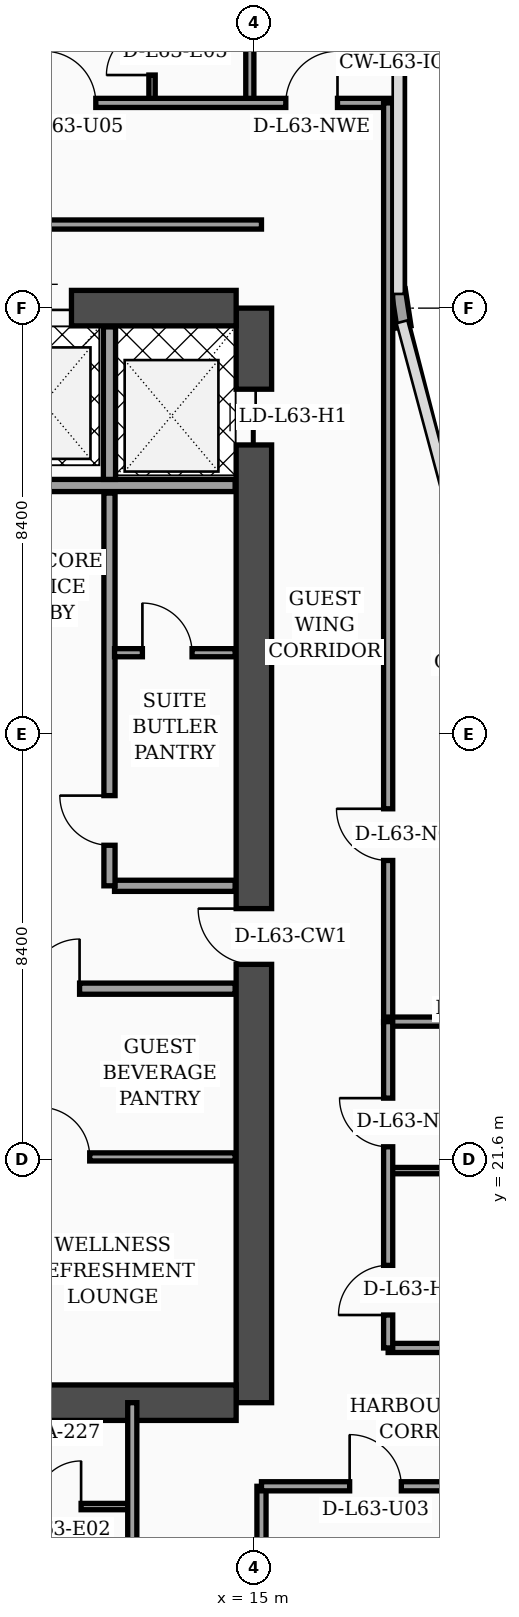
"""IFC4 building model, lengths in metres.
Left out: names, types, materials, properties, quantities, classifications, styles, units other than length and angle.
Written with IfcOpenShell. Run it as: python <this file> out.ifc"""

import sys

from ifc_helpers import new_model, si_unit, direction, frame, frame_2d, origin, place, context, subcontext, project, spatial, rectangle, extrude, element, fill, save


model = new_model("IFC4")
c1 = context("Model", 3, precision=1e-05, world=origin(), true_north=direction((0.0, 1.0)))
c2 = subcontext(c1, "Body", "Model", "MODEL_VIEW")
j1 = project(units=[si_unit("LENGTHUNIT", "METRE"), si_unit("PLANEANGLEUNIT", "RADIAN")], contexts=[c1])
p1 = place(None, origin())
s1 = spatial("IfcSite", under=j1, at=p1, CompositionType="ELEMENT")
p2 = place(p1, origin())
s2 = spatial("IfcBuilding", under=s1, at=p2, CompositionType="ELEMENT")
p3 = place(p2, frame((0.0, 0.0, 255.2)))
s3 = spatial("IfcBuildingStorey", under=s2, at=p3, CompositionType="ELEMENT", Elevation=255.2)
p4 = place(p3, frame((15.0, 16.8, 0.0), z_axis=(0.0, 0.0, 1.0), x_axis=(0.0, 1.0, 0.0)))
e1 = element("IfcWall", 1, at=p4, inside=s3, PredefinedType="SHEAR", context=c2, shape_type="SweptSolid", body=[
    extrude(rectangle(XDim=21.6, YDim=0.7, at=frame_2d((10.8, 0.0))), origin(), (0.0, 0.0, 1.0), 3.56),
])
p5 = place(p4, frame((8.65, 0.0, 0.0)))
e2 = element("IfcOpeningElement", 2, at=p5, cuts=e1, PredefinedType="OPENING", context=c2, shape_type="SweptSolid", body=[
    extrude(rectangle(XDim=1.1, YDim=2.2, at=frame_2d((0.55, 1.1))), frame((0.0, 0.36, 0.0), z_axis=(0.0, -1.0, 0.0), x_axis=(1.0, 0.0, 0.0)), (0.0, 0.0, 1.0), 0.72),
])
p6 = place(p4, frame((18.9, 0.0, 0.0)))
e3 = element("IfcOpeningElement", 3, at=p6, cuts=e1, PredefinedType="OPENING", context=c2, shape_type="SweptSolid", body=[
    extrude(rectangle(XDim=1.1, YDim=2.2, at=frame_2d((0.55, 1.1))), frame((0.0, 0.36, 0.0), z_axis=(0.0, -1.0, 0.0), x_axis=(1.0, 0.0, 0.0)), (0.0, 0.0, 1.0), 0.72),
])
p7 = place(p3, frame((4.55, 38.4, 0.0), z_axis=(0.0, 0.0, 1.0), x_axis=(1.0, 0.0, 0.0)))
e4 = element("IfcWall", 4, at=p7, inside=s3, PredefinedType="SHEAR", context=c2, shape_type="SweptSolid", body=[
    extrude(rectangle(XDim=10.1, YDim=0.7, at=frame_2d((5.05, 0.0))), origin(), (0.0, 0.0, 1.0), 3.56),
])
p8 = place(p7, frame((5.75, 0.0, 0.0)))
e5 = element("IfcOpeningElement", 5, at=p8, cuts=e4, PredefinedType="OPENING", context=c2, shape_type="SweptSolid", body=[
    extrude(rectangle(XDim=1.1, YDim=2.2, at=frame_2d((0.55, 1.1))), frame((0.0, 0.36, 0.0), z_axis=(0.0, -1.0, 0.0), x_axis=(1.0, 0.0, 0.0)), (0.0, 0.0, 1.0), 0.72),
])
p9 = place(p3, frame((4.55, 16.8, 0.0), z_axis=(0.0, 0.0, 1.0), x_axis=(1.0, 0.0, 0.0)))
e6 = element("IfcWall", 6, at=p9, inside=s3, PredefinedType="SHEAR", context=c2, shape_type="SweptSolid", body=[
    extrude(rectangle(XDim=10.1, YDim=0.7, at=frame_2d((5.05, 0.0))), origin(), (0.0, 0.0, 1.0), 3.56),
])
p10 = place(p3, frame((17.962, 38.03, 0.0), z_axis=(0.0, 0.0, 1.0), x_axis=(-0.15141125477, 0.988470855377, 0.0)))
e7 = element("IfcWall", 7, at=p10, inside=s3, PredefinedType="SOLIDWALL", context=c2, shape_type="SweptSolid", body=[
    extrude(rectangle(XDim=0.739, YDim=0.28, at=frame_2d((0.369, 0.0))), origin(), (0.0, 0.0, 1.0), 3.56),
])
p11 = place(p3, frame((9.68, 21.65, 0.0), z_axis=(0.0, 0.0, 1.0), x_axis=(1.0, 0.0, 0.0)))
e8 = element("IfcWall", 8, at=p11, inside=s3, PredefinedType="PARTITIONING", context=c2, shape_type="SweptSolid", body=[
    extrude(rectangle(XDim=4.95, YDim=0.16, at=frame_2d((2.475, 0.0))), origin(), (0.0, 0.0, 1.0), 3.09),
])
p12 = place(p11, frame((1.1, 0.0, 0.0)))
e9 = element("IfcOpeningElement", 9, at=p12, cuts=e8, PredefinedType="OPENING", context=c2, shape_type="SweptSolid", body=[
    extrude(rectangle(XDim=0.98, YDim=2.15, at=frame_2d((0.49, 1.075))), frame((0.0, 0.09, 0.0), z_axis=(0.0, -1.0, 0.0), x_axis=(1.0, 0.0, 0.0)), (0.0, 0.0, 1.0), 0.18),
])
p13 = place(p3, frame((9.68, 24.97, 0.0), z_axis=(0.0, 0.0, 1.0), x_axis=(1.0, 0.0, 0.0)))
e10 = element("IfcWall", 10, at=p13, inside=s3, PredefinedType="SOLIDWALL", context=c2, shape_type="SweptSolid", body=[
    extrude(rectangle(XDim=4.95, YDim=0.22, at=frame_2d((2.475, 0.0))), origin(), (0.0, 0.0, 1.0), 2.99),
])
p14 = place(p13, frame((0.9, 0.0, 0.0)))
e11 = element("IfcOpeningElement", 11, at=p14, cuts=e10, PredefinedType="OPENING", context=c2, shape_type="SweptSolid", body=[
    extrude(rectangle(XDim=0.98, YDim=2.15, at=frame_2d((0.49, 1.075))), frame((0.0, 0.12, 0.0), z_axis=(0.0, -1.0, 0.0), x_axis=(1.0, 0.0, 0.0)), (0.0, 0.0, 1.0), 0.24),
])
p15 = place(p3, frame((12.25, 27.0, 0.0), z_axis=(0.0, 0.0, 1.0), x_axis=(1.0, 0.0, 0.0)))
e12 = element("IfcWall", 12, at=p15, inside=s3, PredefinedType="SOLIDWALL", context=c2, shape_type="SweptSolid", body=[
    extrude(rectangle(XDim=2.38, YDim=0.22, at=frame_2d((1.19, 0.0))), origin(), (0.0, 0.0, 1.0), 3.56),
])
p16 = place(p3, frame((12.15, 27.0, 0.0), z_axis=(0.0, 0.0, 1.0), x_axis=(0.0, 1.0, 0.0)))
e13 = element("IfcWall", 13, at=p16, inside=s3, PredefinedType="SOLIDWALL", context=c2, shape_type="SweptSolid", body=[
    extrude(rectangle(XDim=7.75, YDim=0.22, at=frame_2d((3.875, 0.0))), origin(), (0.0, 0.0, 1.0), 3.56),
])
p17 = place(p16, frame((0.8, 0.0, 0.0)))
e14 = element("IfcOpeningElement", 14, at=p17, cuts=e13, PredefinedType="OPENING", context=c2, shape_type="SweptSolid", body=[
    extrude(rectangle(XDim=0.98, YDim=2.15, at=frame_2d((0.49, 1.075))), frame((0.0, 0.12, 0.0), z_axis=(0.0, -1.0, 0.0), x_axis=(1.0, 0.0, 0.0)), (0.0, 0.0, 1.0), 0.24),
])
p18 = place(p3, frame((12.25, 31.6, 0.0), z_axis=(0.0, 0.0, 1.0), x_axis=(1.0, 0.0, 0.0)))
e15 = element("IfcWall", 15, at=p18, inside=s3, PredefinedType="PARTITIONING", context=c2, shape_type="SweptSolid", body=[
    extrude(rectangle(XDim=2.38, YDim=0.16, at=frame_2d((1.19, 0.0))), origin(), (0.0, 0.0, 1.0), 3.14),
])
p19 = place(p18, frame((0.55, 0.0, 0.0)))
e16 = element("IfcOpeningElement", 16, at=p19, cuts=e15, PredefinedType="OPENING", context=c2, shape_type="SweptSolid", body=[
    extrude(rectangle(XDim=0.98, YDim=2.15, at=frame_2d((0.49, 1.075))), frame((0.0, 0.09, 0.0), z_axis=(0.0, -1.0, 0.0), x_axis=(1.0, 0.0, 0.0)), (0.0, 0.0, 1.0), 0.18),
])
p20 = place(p3, frame((9.66, 34.9, 0.0), z_axis=(0.0, 0.0, 1.0), x_axis=(1.0, 0.0, 0.0)))
e17 = element("IfcWall", 17, at=p20, inside=s3, PredefinedType="SOLIDWALL", context=c2, shape_type="SweptSolid", body=[
    extrude(rectangle(XDim=4.97, YDim=0.24, at=frame_2d((2.485, 0.0))), origin(), (0.0, 0.0, 1.0), 3.56),
])
p21 = place(p3, frame((12.15, 35.02, 0.0), z_axis=(0.0, 0.0, 1.0), x_axis=(0.0, 1.0, 0.0)))
e18 = element("IfcWall", 18, at=p21, inside=s3, PredefinedType="SOLIDWALL", context=c2, shape_type="SweptSolid", body=[
    extrude(rectangle(XDim=3.01, YDim=0.24, at=frame_2d((1.505, 0.0))), origin(), (0.0, 0.0, 1.0), 3.56),
])
p22 = place(p3, frame((0.08, 14.75, 0.0), z_axis=(0.0, 0.0, 1.0), x_axis=(1.0, 0.0, 0.0)))
e19 = element("IfcWall", 19, at=p22, inside=s3, PredefinedType="PARTITIONING", context=c2, shape_type="SweptSolid", body=[
    extrude(rectangle(XDim=12.52, YDim=0.125, at=frame_2d((6.26, 0.0))), origin(), (0.0, 0.0, 1.0), 2.99),
])
p23 = place(p22, frame((4.32, 0.0, 0.0)))
e20 = element("IfcOpeningElement", 20, at=p23, cuts=e19, PredefinedType="OPENING", context=c2, shape_type="SweptSolid", body=[
    extrude(rectangle(XDim=0.96, YDim=2.2, at=frame_2d((0.48, 1.1))), frame((0.0, 0.073, 0.0), z_axis=(0.0, -1.0, 0.0), x_axis=(1.0, 0.0, 0.0)), (0.0, 0.0, 1.0), 0.145),
])
p24 = place(p22, frame((10.61, 0.0, 0.0)))
e21 = element("IfcOpeningElement", 21, at=p24, cuts=e19, PredefinedType="OPENING", context=c2, shape_type="SweptSolid", body=[
    extrude(rectangle(XDim=0.9, YDim=2.15, at=frame_2d((0.45, 1.075))), frame((0.0, 0.073, 0.0), z_axis=(0.0, -1.0, 0.0), x_axis=(1.0, 0.0, 0.0)), (0.0, 0.0, 1.0), 0.145),
])
p25 = place(p3, frame((12.6, 2.44, 0.0), z_axis=(0.0, 0.0, 1.0), x_axis=(0.0, 1.0, 0.0)))
e22 = element("IfcWall", 22, at=p25, inside=s3, PredefinedType="PARTITIONING", context=c2, shape_type="SweptSolid", body=[
    extrude(rectangle(XDim=14.36, YDim=0.18, at=frame_2d((7.18, 0.0))), origin(), (0.0, 0.0, 1.0), 2.99),
])
p26 = place(p25, frame((3.01, 0.0, 0.0)))
e23 = element("IfcOpeningElement", 23, at=p26, cuts=e22, PredefinedType="OPENING", context=c2, shape_type="SweptSolid", body=[
    extrude(rectangle(XDim=1.02, YDim=2.2, at=frame_2d((0.51, 1.1))), frame((0.0, 0.1, 0.0), z_axis=(0.0, -1.0, 0.0), x_axis=(1.0, 0.0, 0.0)), (0.0, 0.0, 1.0), 0.2),
])
p27 = place(p25, frame((9.95, 0.0, 0.0)))
e24 = element("IfcOpeningElement", 24, at=p27, cuts=e22, PredefinedType="OPENING", context=c2, shape_type="SweptSolid", body=[
    extrude(rectangle(XDim=1.02, YDim=2.2, at=frame_2d((0.51, 1.1))), frame((0.0, 0.1, 0.0), z_axis=(0.0, -1.0, 0.0), x_axis=(1.0, 0.0, 0.0)), (0.0, 0.0, 1.0), 0.2),
])
p28 = place(p3, frame((15.15, 2.44, 0.0), z_axis=(0.0, 0.0, 1.0), x_axis=(0.0, 1.0, 0.0)))
e25 = element("IfcWall", 25, at=p28, inside=s3, PredefinedType="PARTITIONING", context=c2, shape_type="SweptSolid", body=[
    extrude(rectangle(XDim=12.71, YDim=0.18, at=frame_2d((6.355, 0.0))), origin(), (0.0, 0.0, 1.0), 3.09),
])
p29 = place(p3, frame((15.15, 15.15, 0.0), z_axis=(0.0, 0.0, 1.0), x_axis=(1.0, 0.0, 0.0)))
e26 = element("IfcWall", 26, at=p29, inside=s3, PredefinedType="PARTITIONING", context=c2, shape_type="SweptSolid", body=[
    extrude(rectangle(XDim=6.45, YDim=0.18, at=frame_2d((3.225, 0.0))), origin(), (0.0, 0.0, 1.0), 2.59),
])
p30 = place(p29, frame((1.74, 0.0, 0.0)))
e27 = element("IfcOpeningElement", 27, at=p30, cuts=e26, PredefinedType="OPENING", context=c2, shape_type="SweptSolid", body=[
    extrude(rectangle(XDim=1.02, YDim=2.2, at=frame_2d((0.51, 1.1))), frame((0.0, 0.1, 0.0), z_axis=(0.0, -1.0, 0.0), x_axis=(1.0, 0.0, 0.0)), (0.0, 0.0, 1.0), 0.2),
])
p31 = place(p3, frame((14.92, 42.45, 0.0), z_axis=(0.0, 0.0, 1.0), x_axis=(0.0, 1.0, 0.0)))
e28 = element("IfcWall", 28, at=p31, inside=s3, PredefinedType="PARTITIONING", context=c2, shape_type="SweptSolid", body=[
    extrude(rectangle(XDim=5.35, YDim=0.16, at=frame_2d((2.675, 0.0))), origin(), (0.0, 0.0, 1.0), 3.09),
])
p32 = place(p3, frame((12.99, 42.45, 0.0), z_axis=(0.0, 0.0, 1.0), x_axis=(0.0, 1.0, 0.0)))
e29 = element("IfcWall", 29, at=p32, inside=s3, PredefinedType="PARTITIONING", context=c2, shape_type="SweptSolid", body=[
    extrude(rectangle(XDim=8.49, YDim=0.125, at=frame_2d((4.245, 0.0))), origin(), (0.0, 0.0, 1.0), 3.09),
])
p33 = place(p32, frame((0.55, 0.0, 0.0)))
e30 = element("IfcOpeningElement", 30, at=p33, cuts=e29, PredefinedType="OPENING", context=c2, shape_type="SweptSolid", body=[
    extrude(rectangle(XDim=0.9, YDim=2.15, at=frame_2d((0.45, 1.075))), frame((0.0, 0.073, 0.0), z_axis=(0.0, -1.0, 0.0), x_axis=(1.0, 0.0, 0.0)), (0.0, 0.0, 1.0), 0.145),
])
p34 = place(p32, frame((4.72, 0.0, 0.0)))
e31 = element("IfcOpeningElement", 31, at=p34, cuts=e29, PredefinedType="OPENING", context=c2, shape_type="SweptSolid", body=[
    extrude(rectangle(XDim=0.96, YDim=2.2, at=frame_2d((0.48, 1.1))), frame((0.0, 0.073, 0.0), z_axis=(0.0, -1.0, 0.0), x_axis=(1.0, 0.0, 0.0)), (0.0, 0.0, 1.0), 0.145),
])
p35 = place(p3, frame((0.08, 42.45, 0.0), z_axis=(0.0, 0.0, 1.0), x_axis=(1.0, 0.0, 0.0)))
e32 = element("IfcWall", 32, at=p35, inside=s3, PredefinedType="PARTITIONING", context=c2, shape_type="SweptSolid", body=[
    extrude(rectangle(XDim=17.77, YDim=0.18, at=frame_2d((8.885, 0.0))), origin(), (0.0, 0.0, 1.0), 2.99),
])
p36 = place(p35, frame((0.9, 0.0, 0.0)))
e33 = element("IfcOpeningElement", 33, at=p36, cuts=e32, PredefinedType="OPENING", context=c2, shape_type="SweptSolid", body=[
    extrude(rectangle(XDim=1.02, YDim=2.2, at=frame_2d((0.51, 1.1))), frame((0.0, 0.1, 0.0), z_axis=(0.0, -1.0, 0.0), x_axis=(1.0, 0.0, 0.0)), (0.0, 0.0, 1.0), 0.2),
])
p37 = place(p35, frame((4.9, 0.0, 0.0)))
e34 = element("IfcOpeningElement", 34, at=p37, cuts=e32, PredefinedType="OPENING", context=c2, shape_type="SweptSolid", body=[
    extrude(rectangle(XDim=1.02, YDim=2.2, at=frame_2d((0.51, 1.1))), frame((0.0, 0.1, 0.0), z_axis=(0.0, -1.0, 0.0), x_axis=(1.0, 0.0, 0.0)), (0.0, 0.0, 1.0), 0.2),
])
p38 = place(p35, frame((10.78, 0.0, 0.0)))
e35 = element("IfcOpeningElement", 35, at=p38, cuts=e32, PredefinedType="OPENING", context=c2, shape_type="SweptSolid", body=[
    extrude(rectangle(XDim=1.02, YDim=2.2, at=frame_2d((0.51, 1.1))), frame((0.0, 0.1, 0.0), z_axis=(0.0, -1.0, 0.0), x_axis=(1.0, 0.0, 0.0)), (0.0, 0.0, 1.0), 0.2),
])
p39 = place(p35, frame((15.55, 0.0, 0.0)))
e36 = element("IfcOpeningElement", 36, at=p39, cuts=e32, PredefinedType="OPENING", context=c2, shape_type="SweptSolid", body=[
    extrude(rectangle(XDim=1.02, YDim=2.2, at=frame_2d((0.51, 1.1))), frame((0.0, 0.1, 0.0), z_axis=(0.0, -1.0, 0.0), x_axis=(1.0, 0.0, 0.0)), (0.0, 0.0, 1.0), 0.2),
])
p40 = place(p3, frame((17.65, 24.3, 0.0), z_axis=(0.0, 0.0, 1.0), x_axis=(0.0, 1.0, 0.0)))
e37 = element("IfcWall", 37, at=p40, inside=s3, PredefinedType="PARTITIONING", context=c2, shape_type="SweptSolid", body=[
    extrude(rectangle(XDim=18.15, YDim=0.18, at=frame_2d((9.075, 0.0))), origin(), (0.0, 0.0, 1.0), 2.99),
])
p41 = place(p40, frame((3.2, 0.0, 0.0)))
e38 = element("IfcOpeningElement", 38, at=p41, cuts=e37, PredefinedType="OPENING", context=c2, shape_type="SweptSolid", body=[
    extrude(rectangle(XDim=1.02, YDim=2.2, at=frame_2d((0.51, 1.1))), frame((0.0, 0.1, 0.0), z_axis=(0.0, -1.0, 0.0), x_axis=(1.0, 0.0, 0.0)), (0.0, 0.0, 1.0), 0.2),
])
p42 = place(p3, frame((3.83, 40.05, 0.0), z_axis=(0.0, 0.0, 1.0), x_axis=(1.0, 0.0, 0.0)))
e39 = element("IfcWall", 39, at=p42, inside=s3, PredefinedType="PARTITIONING", context=c2, shape_type="SweptSolid", body=[
    extrude(rectangle(XDim=11.32, YDim=0.18, at=frame_2d((5.66, 0.0))), origin(), (0.0, 0.0, 1.0), 2.99),
])
p43 = place(p3, frame((17.65, 17.88, 0.0), z_axis=(0.0, 0.0, 1.0), x_axis=(1.0, 0.0, 0.0)))
e40 = element("IfcWall", 40, at=p43, inside=s3, PredefinedType="PARTITIONING", context=c2, shape_type="SweptSolid", body=[
    extrude(rectangle(XDim=3.9, YDim=0.18, at=frame_2d((1.95, 0.0))), origin(), (0.0, 0.0, 1.0), 3.56),
])
p44 = place(p3, frame((17.65, 21.38, 0.0), z_axis=(0.0, 0.0, 1.0), x_axis=(1.0, 0.0, 0.0)))
e41 = element("IfcWall", 41, at=p44, inside=s3, PredefinedType="PARTITIONING", context=c2, shape_type="SweptSolid", body=[
    extrude(rectangle(XDim=3.9, YDim=0.125, at=frame_2d((1.95, 0.0))), origin(), (0.0, 0.0, 1.0), 3.09),
])
p45 = place(p3, frame((17.65, 24.32, 0.0), z_axis=(0.0, 0.0, 1.0), x_axis=(1.0, 0.0, 0.0)))
e42 = element("IfcWall", 42, at=p45, inside=s3, PredefinedType="PARTITIONING", context=c2, shape_type="SweptSolid", body=[
    extrude(rectangle(XDim=3.95, YDim=0.18, at=frame_2d((1.975, 0.0))), origin(), (0.0, 0.0, 1.0), 3.56),
])
p46 = place(p3, frame((17.65, 17.88, 0.0), z_axis=(0.0, 0.0, 1.0), x_axis=(0.0, 1.0, 0.0)))
e43 = element("IfcWall", 43, at=p46, inside=s3, PredefinedType="PARTITIONING", context=c2, shape_type="SweptSolid", body=[
    extrude(rectangle(XDim=6.44, YDim=0.18, at=frame_2d((3.22, 0.0))), origin(), (0.0, 0.0, 1.0), 3.09),
])
p47 = place(p46, frame((0.65, 0.0, 0.0)))
e44 = element("IfcOpeningElement", 44, at=p47, cuts=e43, PredefinedType="OPENING", context=c2, shape_type="SweptSolid", body=[
    extrude(rectangle(XDim=0.98, YDim=2.15, at=frame_2d((0.49, 1.075))), frame((0.0, 0.1, 0.0), z_axis=(0.0, -1.0, 0.0), x_axis=(1.0, 0.0, 0.0)), (0.0, 0.0, 1.0), 0.2),
])
p48 = place(p46, frame((3.97, 0.0, 0.0)))
e45 = element("IfcOpeningElement", 45, at=p48, cuts=e43, PredefinedType="OPENING", context=c2, shape_type="SweptSolid", body=[
    extrude(rectangle(XDim=0.96, YDim=2.2, at=frame_2d((0.48, 1.1))), frame((0.0, 0.1, 0.0), z_axis=(0.0, -1.0, 0.0), x_axis=(1.0, 0.0, 0.0)), (0.0, 0.0, 1.0), 0.2),
])
p49 = place(p12, origin())
e46 = element("IfcDoor", 46, at=p49, inside=s3, OperationType="SINGLE_SWING_LEFT", PredefinedType="DOOR", context=c2, shape_type="SweptSolid", body=[
    extrude(rectangle(XDim=0.98, YDim=2.15, at=frame_2d((0.49, 1.075))), frame((0.0, 0.025, 0.0), z_axis=(0.0, -1.0, 0.0), x_axis=(1.0, 0.0, 0.0)), (0.0, 0.0, 1.0), 0.05),
])
fill(e9, e46)
p50 = place(p14, origin())
e47 = element("IfcDoor", 47, at=p50, inside=s3, OperationType="SINGLE_SWING_RIGHT", PredefinedType="DOOR", context=c2, shape_type="SweptSolid", body=[
    extrude(rectangle(XDim=0.98, YDim=2.15, at=frame_2d((0.49, 1.075))), frame((0.0, 0.025, 0.0), z_axis=(0.0, -1.0, 0.0), x_axis=(1.0, 0.0, 0.0)), (0.0, 0.0, 1.0), 0.05),
])
fill(e11, e47)
p51 = place(p17, origin())
e48 = element("IfcDoor", 48, at=p51, inside=s3, OperationType="SINGLE_SWING_RIGHT", PredefinedType="DOOR", context=c2, shape_type="SweptSolid", body=[
    extrude(rectangle(XDim=0.98, YDim=2.15, at=frame_2d((0.49, 1.075))), frame((0.0, 0.025, 0.0), z_axis=(0.0, -1.0, 0.0), x_axis=(1.0, 0.0, 0.0)), (0.0, 0.0, 1.0), 0.05),
])
fill(e14, e48)
p52 = place(p19, origin())
e49 = element("IfcDoor", 49, at=p52, inside=s3, OperationType="SINGLE_SWING_LEFT", PredefinedType="DOOR", context=c2, shape_type="SweptSolid", body=[
    extrude(rectangle(XDim=0.98, YDim=2.15, at=frame_2d((0.49, 1.075))), frame((0.0, 0.025, 0.0), z_axis=(0.0, -1.0, 0.0), x_axis=(1.0, 0.0, 0.0)), (0.0, 0.0, 1.0), 0.05),
])
fill(e16, e49)
p53 = place(p24, origin())
e50 = element("IfcDoor", 50, at=p53, inside=s3, OperationType="SINGLE_SWING_RIGHT", PredefinedType="DOOR", context=c2, shape_type="SweptSolid", body=[
    extrude(rectangle(XDim=0.9, YDim=2.15, at=frame_2d((0.45, 1.075))), frame((0.0, 0.025, 0.0), z_axis=(0.0, -1.0, 0.0), x_axis=(1.0, 0.0, 0.0)), (0.0, 0.0, 1.0), 0.05),
])
fill(e21, e50)
p54 = place(p30, origin())
e51 = element("IfcDoor", 51, at=p54, inside=s3, OperationType="SINGLE_SWING_LEFT", PredefinedType="DOOR", context=c2, shape_type="SweptSolid", body=[
    extrude(rectangle(XDim=1.02, YDim=2.2, at=frame_2d((0.51, 1.1))), frame((0.0, 0.025, 0.0), z_axis=(0.0, -1.0, 0.0), x_axis=(1.0, 0.0, 0.0)), (0.0, 0.0, 1.0), 0.05),
])
fill(e27, e51)
p55 = place(p33, origin())
e52 = element("IfcDoor", 52, at=p55, inside=s3, OperationType="SINGLE_SWING_LEFT", PredefinedType="DOOR", context=c2, shape_type="SweptSolid", body=[
    extrude(rectangle(XDim=0.9, YDim=2.15, at=frame_2d((0.45, 1.075))), frame((0.0, 0.025, 0.0), z_axis=(0.0, -1.0, 0.0), x_axis=(1.0, 0.0, 0.0)), (0.0, 0.0, 1.0), 0.05),
])
fill(e30, e52)
p56 = place(p38, origin())
e53 = element("IfcDoor", 53, at=p56, inside=s3, OperationType="SINGLE_SWING_LEFT", PredefinedType="DOOR", context=c2, shape_type="SweptSolid", body=[
    extrude(rectangle(XDim=1.02, YDim=2.2, at=frame_2d((0.51, 1.1))), frame((0.0, 0.025, 0.0), z_axis=(0.0, -1.0, 0.0), x_axis=(1.0, 0.0, 0.0)), (0.0, 0.0, 1.0), 0.05),
])
fill(e35, e53)
p57 = place(p39, origin())
e54 = element("IfcDoor", 54, at=p57, inside=s3, OperationType="SINGLE_SWING_RIGHT", PredefinedType="DOOR", context=c2, shape_type="SweptSolid", body=[
    extrude(rectangle(XDim=1.02, YDim=2.2, at=frame_2d((0.51, 1.1))), frame((0.0, 0.025, 0.0), z_axis=(0.0, -1.0, 0.0), x_axis=(1.0, 0.0, 0.0)), (0.0, 0.0, 1.0), 0.05),
])
fill(e36, e54)
p58 = place(p41, origin())
e55 = element("IfcDoor", 55, at=p58, inside=s3, OperationType="SINGLE_SWING_RIGHT", PredefinedType="DOOR", context=c2, shape_type="SweptSolid", body=[
    extrude(rectangle(XDim=1.02, YDim=2.2, at=frame_2d((0.51, 1.1))), frame((0.0, 0.025, 0.0), z_axis=(0.0, -1.0, 0.0), x_axis=(1.0, 0.0, 0.0)), (0.0, 0.0, 1.0), 0.05),
])
fill(e38, e55)
p59 = place(p47, origin())
e56 = element("IfcDoor", 56, at=p59, inside=s3, OperationType="SINGLE_SWING_LEFT", PredefinedType="DOOR", context=c2, shape_type="SweptSolid", body=[
    extrude(rectangle(XDim=0.98, YDim=2.15, at=frame_2d((0.49, 1.075))), frame((0.0, 0.025, 0.0), z_axis=(0.0, -1.0, 0.0), x_axis=(1.0, 0.0, 0.0)), (0.0, 0.0, 1.0), 0.05),
])
fill(e44, e56)
p60 = place(p48, origin())
e57 = element("IfcDoor", 57, at=p60, inside=s3, OperationType="SINGLE_SWING_RIGHT", PredefinedType="DOOR", context=c2, shape_type="SweptSolid", body=[
    extrude(rectangle(XDim=0.96, YDim=2.2, at=frame_2d((0.48, 1.1))), frame((0.0, 0.025, 0.0), z_axis=(0.0, -1.0, 0.0), x_axis=(1.0, 0.0, 0.0)), (0.0, 0.0, 1.0), 0.05),
])
fill(e45, e57)
p61 = place(p5, origin())
e58 = element("IfcDoor", 58, at=p61, inside=s3, OperationType="SINGLE_SWING_RIGHT", PredefinedType="DOOR", context=c2, shape_type="SweptSolid", body=[
    extrude(rectangle(XDim=1.1, YDim=2.2, at=frame_2d((0.55, 1.1))), frame((0.0, 0.025, 0.0), z_axis=(0.0, -1.0, 0.0), x_axis=(1.0, 0.0, 0.0)), (0.0, 0.0, 1.0), 0.05),
])
fill(e2, e58)
p62 = place(p6, origin())
e59 = element("IfcDoor", 59, at=p62, inside=s3, OperationType="DOUBLE_DOOR_SLIDING", PredefinedType="DOOR", context=c2, shape_type="SweptSolid", body=[
    extrude(rectangle(XDim=1.1, YDim=2.2, at=frame_2d((0.55, 1.1))), frame((0.0, 0.025, 0.0), z_axis=(0.0, -1.0, 0.0), x_axis=(1.0, 0.0, 0.0)), (0.0, 0.0, 1.0), 0.05),
])
fill(e3, e59)
p63 = place(p8, origin())
e60 = element("IfcDoor", 60, at=p63, inside=s3, OperationType="DOUBLE_DOOR_SLIDING", PredefinedType="DOOR", context=c2, shape_type="SweptSolid", body=[
    extrude(rectangle(XDim=1.1, YDim=2.2, at=frame_2d((0.55, 1.1))), frame((0.0, 0.025, 0.0), z_axis=(0.0, -1.0, 0.0), x_axis=(1.0, 0.0, 0.0)), (0.0, 0.0, 1.0), 0.05),
])
fill(e5, e60)
save(model, sys.argv[1])
